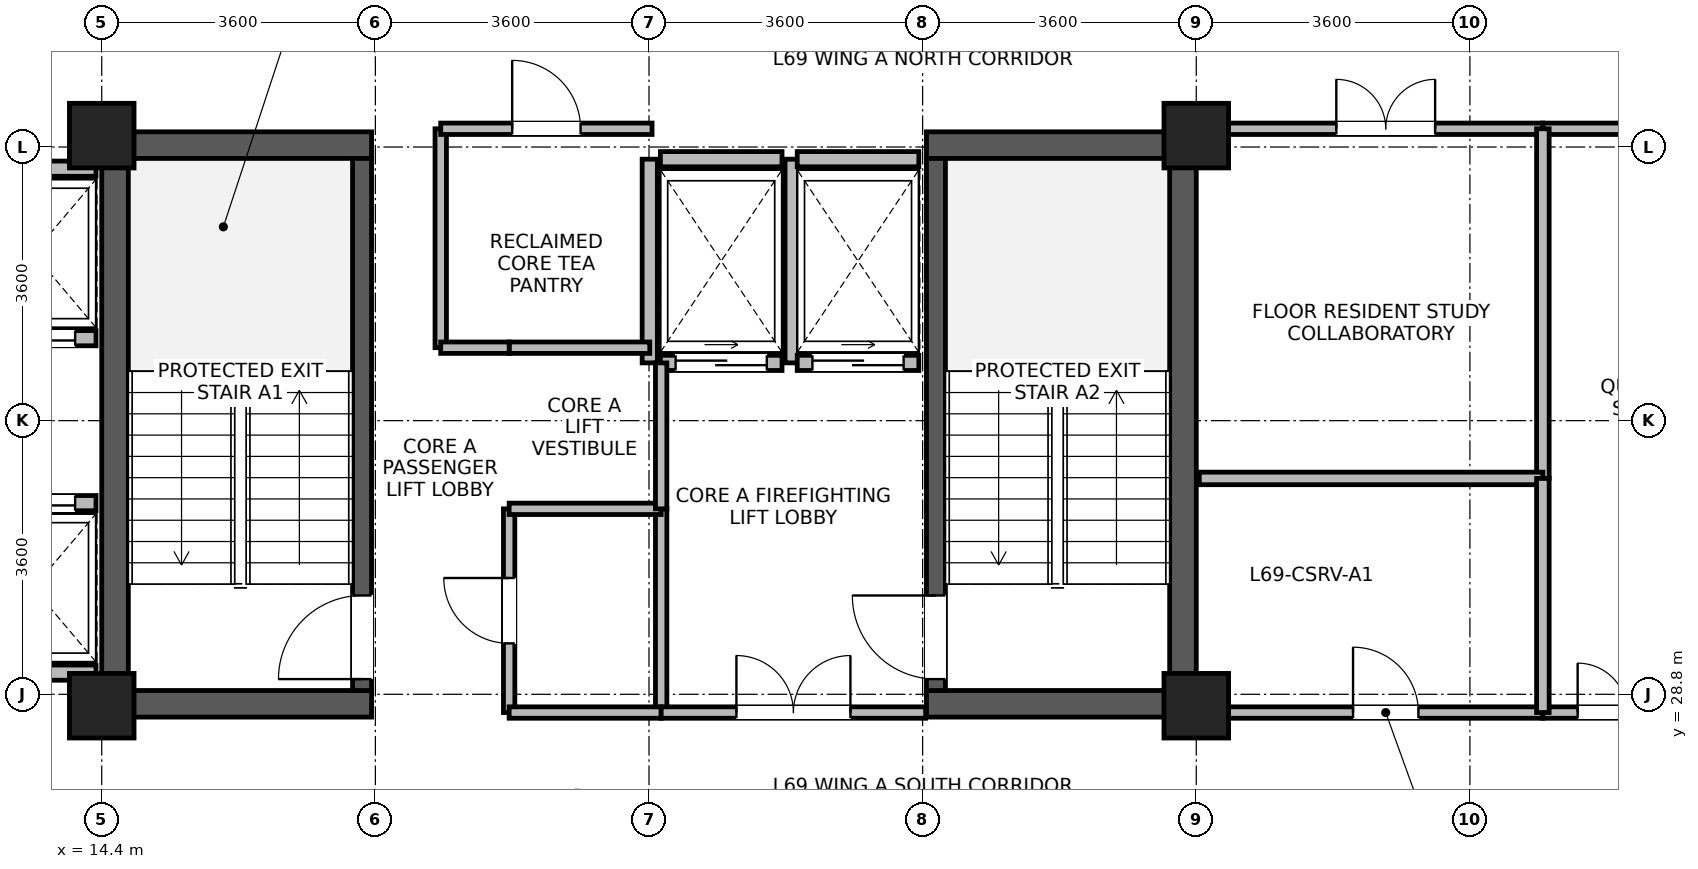
"""IFC4 building model, lengths in metres.
Left out: names, types, materials, properties, quantities, classifications, styles, units other than length and angle.
Written with IfcOpenShell. Run it as: python <this file> out.ifc"""

import sys

from ifc_helpers import new_model, si_unit, direction, frame, frame_2d, origin, origin_2d, place, context, subcontext, project, spatial, rectangle, extrude, source, transform, mapped, element, fill, save


model = new_model("IFC4")
c1 = context("Model", 3, precision=1e-05, world=origin(), true_north=direction((0.0, 1.0)))
c2 = subcontext(c1, "Body", "Model", "MODEL_VIEW")
j1 = project(units=[si_unit("LENGTHUNIT", "METRE"), si_unit("PLANEANGLEUNIT", "RADIAN")], contexts=[c1])
p1 = place(None, origin())
s1 = spatial("IfcSite", under=j1, at=p1, CompositionType="ELEMENT")
p2 = place(p1, origin())
s2 = spatial("IfcBuilding", under=s1, at=p2, CompositionType="ELEMENT")
p3 = place(p2, frame((0.0, 0.0, 268.4)))
s3 = spatial("IfcBuildingStorey", under=s2, at=p3, CompositionType="ELEMENT", Elevation=268.4)
for number, where, z_axis, x_axis in (
    (1, (14.575, 28.5, 0.0), (0.0, 0.0, 1.0), (0.0, 1.0, 0.0)),
    (2, (28.625, 28.5, 0.0), (0.0, 0.0, 1.0), (0.0, 1.0, 0.0)),
):
    element("IfcWall", number, at=place(p3, frame(where, z_axis=z_axis, x_axis=x_axis)), inside=s3, PredefinedType="SHEAR", context=c2, shape_type="SweptSolid", body=[
        extrude(rectangle(XDim=7.7, YDim=0.35, at=frame_2d((3.85, 0.0))), origin(), (0.0, 0.0, 1.0), 3.475),
    ])
for number, where, z_axis, x_axis in (
    (3, (14.75, 28.675, 0.0), (0.0, 0.0, 1.0), (1.0, 0.0, 0.0)),
    (4, (25.25, 28.675, 0.0), (0.0, 0.0, 1.0), (1.0, 0.0, 0.0)),
    (5, (14.75, 36.025, 0.0), (0.0, 0.0, 1.0), (1.0, 0.0, 0.0)),
    (6, (25.25, 36.025, 0.0), (0.0, 0.0, 1.0), (1.0, 0.0, 0.0)),
):
    element("IfcWall", number, at=place(p3, frame(where, z_axis=z_axis, x_axis=x_axis)), inside=s3, PredefinedType="SHEAR", context=c2, shape_type="SweptSolid", body=[
        extrude(rectangle(XDim=3.2, YDim=0.35, at=frame_2d((1.6, 0.0))), origin(), (0.0, 0.0, 1.0), 3.475),
    ])
p4 = place(p3, frame((17.825, 28.85, 0.0), z_axis=(0.0, 0.0, 1.0), x_axis=(0.0, 1.0, 0.0)))
e7 = element("IfcWall", 7, at=p4, inside=s3, PredefinedType="SHEAR", context=c2, shape_type="SweptSolid", body=[
    extrude(rectangle(XDim=7.0, YDim=0.25, at=frame_2d((3.5, 0.0))), origin(), (0.0, 0.0, 1.0), 3.475),
])
p5 = place(p4, frame((0.15, 0.0, 0.0)))
e8 = element("IfcOpeningElement", 8, at=p5, cuts=e7, PredefinedType="OPENING", context=c2, shape_type="SweptSolid", body=[
    extrude(rectangle(XDim=1.1, YDim=2.08, at=frame_2d((0.55, 1.04))), frame((0.0, 0.135, 0.0), z_axis=(0.0, -1.0, 0.0), x_axis=(1.0, 0.0, 0.0)), (0.0, 0.0, 1.0), 0.27),
])
p6 = place(p3, frame((25.375, 28.85, 0.0), z_axis=(0.0, 0.0, 1.0), x_axis=(0.0, 1.0, 0.0)))
e9 = element("IfcWall", 9, at=p6, inside=s3, PredefinedType="SHEAR", context=c2, shape_type="SweptSolid", body=[
    extrude(rectangle(XDim=7.0, YDim=0.25, at=frame_2d((3.5, 0.0))), origin(), (0.0, 0.0, 1.0), 3.475),
])
p7 = place(p6, frame((0.15, 0.0, 0.0)))
e10 = element("IfcOpeningElement", 10, at=p7, cuts=e9, PredefinedType="OPENING", context=c2, shape_type="SweptSolid", body=[
    extrude(rectangle(XDim=1.1, YDim=2.08, at=frame_2d((0.55, 1.04))), frame((0.0, 0.135, 0.0), z_axis=(0.0, -1.0, 0.0), x_axis=(1.0, 0.0, 0.0)), (0.0, 0.0, 1.0), 0.27),
])
m1 = source(origin(), c2, "Body", "SweptSolid", [
    extrude(rectangle(XDim=0.85, YDim=0.85, at=origin_2d()), origin(), (0.0, 0.0, 1.0), 3.7),
])
for number, where, z_axis, x_axis in (
    (11, (14.4, 28.65, 0.0), (0.0, 0.0, 1.0), (1.0, 0.0, 0.0)),
    (12, (14.4, 36.15, 0.0), (0.0, 0.0, 1.0), (1.0, 0.0, 0.0)),
    (13, (28.8, 28.65, 0.0), (0.0, 0.0, 1.0), (1.0, 0.0, 0.0)),
    (14, (28.8, 36.15, 0.0), (0.0, 0.0, 1.0), (1.0, 0.0, 0.0)),
):
    element("IfcColumn", number, at=place(p3, frame(where, z_axis=z_axis, x_axis=x_axis)), inside=s3, PredefinedType="COLUMN", context=c2, shape_type="MappedRepresentation", body=[
        mapped(m1, transform((0.0, 0.0, 0.0), x_axis=(1.0, 0.0, 0.0), y_axis=(0.0, 1.0, 0.0), z_axis=(0.0, 0.0, 1.0), scale=1.0)),
    ])
p8 = place(p3, frame((12.675, 33.485, 0.0), z_axis=(0.0, 0.0, 1.0), x_axis=(1.0, 0.0, 0.0)))
e15 = element("IfcWall", 15, at=p8, inside=s3, PredefinedType="PARTITIONING", context=c2, shape_type="SweptSolid", body=[
    extrude(rectangle(XDim=1.65, YDim=0.2, at=frame_2d((0.825, 0.0))), origin(), (0.0, 0.0, 1.0), 3.455),
])
p9 = place(p8, frame((0.275, 0.0, 0.0)))
e16 = element("IfcOpeningElement", 16, at=p9, cuts=e15, PredefinedType="OPENING", context=c2, shape_type="SweptSolid", body=[
    extrude(rectangle(XDim=1.1, YDim=2.12, at=frame_2d((0.55, 1.06))), frame((0.0, 0.11, 0.0), z_axis=(0.0, -1.0, 0.0), x_axis=(1.0, 0.0, 0.0)), (0.0, 0.0, 1.0), 0.22),
])
for number, where, z_axis, x_axis in (
    (17, (12.675, 35.715, 0.0), (0.0, 0.0, 1.0), (1.0, 0.0, 0.0)),
    (18, (12.675, 29.085, 0.0), (0.0, 0.0, 1.0), (1.0, 0.0, 0.0)),
):
    element("IfcWall", number, at=place(p3, frame(where, z_axis=z_axis, x_axis=x_axis)), inside=s3, PredefinedType="PARTITIONING", context=c2, shape_type="SweptSolid", body=[
        extrude(rectangle(XDim=1.65, YDim=0.2, at=frame_2d((0.825, 0.0))), origin(), (0.0, 0.0, 1.0), 3.455),
    ])
p10 = place(p3, frame((12.675, 31.315, 0.0), z_axis=(0.0, 0.0, 1.0), x_axis=(1.0, 0.0, 0.0)))
e19 = element("IfcWall", 19, at=p10, inside=s3, PredefinedType="PARTITIONING", context=c2, shape_type="SweptSolid", body=[
    extrude(rectangle(XDim=1.65, YDim=0.2, at=frame_2d((0.825, 0.0))), origin(), (0.0, 0.0, 1.0), 3.455),
])
p11 = place(p10, frame((0.275, 0.0, 0.0)))
e20 = element("IfcOpeningElement", 20, at=p11, cuts=e19, PredefinedType="OPENING", context=c2, shape_type="SweptSolid", body=[
    extrude(rectangle(XDim=1.1, YDim=2.12, at=frame_2d((0.55, 1.06))), frame((0.0, 0.11, 0.0), z_axis=(0.0, -1.0, 0.0), x_axis=(1.0, 0.0, 0.0)), (0.0, 0.0, 1.0), 0.22),
])
p12 = place(p3, frame((21.75, 33.16, 0.0), z_axis=(0.0, 0.0, 1.0), x_axis=(1.0, 0.0, 0.0)))
e21 = element("IfcWall", 21, at=p12, inside=s3, PredefinedType="PARTITIONING", context=c2, shape_type="SweptSolid", body=[
    extrude(rectangle(XDim=1.6, YDim=0.2, at=frame_2d((0.8, 0.0))), origin(), (0.0, 0.0, 1.0), 3.455),
])
p13 = place(p12, frame((0.2, 0.0, 0.0)))
e22 = element("IfcOpeningElement", 22, at=p13, cuts=e21, PredefinedType="OPENING", context=c2, shape_type="SweptSolid", body=[
    extrude(rectangle(XDim=1.2, YDim=2.12, at=frame_2d((0.6, 1.06))), frame((0.0, 0.11, 0.0), z_axis=(0.0, -1.0, 0.0), x_axis=(1.0, 0.0, 0.0)), (0.0, 0.0, 1.0), 0.22),
])
p14 = place(p3, frame((21.75, 35.84, 0.0), z_axis=(0.0, 0.0, 1.0), x_axis=(1.0, 0.0, 0.0)))
e23 = element("IfcWall", 23, at=p14, inside=s3, PredefinedType="PARTITIONING", context=c2, shape_type="SweptSolid", body=[
    extrude(rectangle(XDim=1.6, YDim=0.2, at=frame_2d((0.8, 0.0))), origin(), (0.0, 0.0, 1.0), 2.555),
])
for number, where, z_axis, x_axis in (
    (24, (21.61, 33.16, 0.0), (0.0, 0.0, 1.0), (0.0, 1.0, 0.0)),
    (25, (23.49, 33.16, 0.0), (0.0, 0.0, 1.0), (0.0, 1.0, 0.0)),
):
    element("IfcWall", number, at=place(p3, frame(where, z_axis=z_axis, x_axis=x_axis)), inside=s3, PredefinedType="PARTITIONING", context=c2, shape_type="SweptSolid", body=[
        extrude(rectangle(XDim=2.68, YDim=0.2, at=frame_2d((1.34, 0.0))), origin(), (0.0, 0.0, 1.0), 3.455),
    ])
p15 = place(p3, frame((23.55, 33.16, 0.0), z_axis=(0.0, 0.0, 1.0), x_axis=(1.0, 0.0, 0.0)))
e26 = element("IfcWall", 26, at=p15, inside=s3, PredefinedType="PARTITIONING", context=c2, shape_type="SweptSolid", body=[
    extrude(rectangle(XDim=1.6, YDim=0.2, at=frame_2d((0.8, 0.0))), origin(), (0.0, 0.0, 1.0), 3.455),
])
p16 = place(p15, frame((0.2, 0.0, 0.0)))
e27 = element("IfcOpeningElement", 27, at=p16, cuts=e26, PredefinedType="OPENING", context=c2, shape_type="SweptSolid", body=[
    extrude(rectangle(XDim=1.2, YDim=2.12, at=frame_2d((0.6, 1.06))), frame((0.0, 0.11, 0.0), z_axis=(0.0, -1.0, 0.0), x_axis=(1.0, 0.0, 0.0)), (0.0, 0.0, 1.0), 0.22),
])
p17 = place(p3, frame((23.55, 35.84, 0.0), z_axis=(0.0, 0.0, 1.0), x_axis=(1.0, 0.0, 0.0)))
e28 = element("IfcWall", 28, at=p17, inside=s3, PredefinedType="PARTITIONING", context=c2, shape_type="SweptSolid", body=[
    extrude(rectangle(XDim=1.6, YDim=0.2, at=frame_2d((0.8, 0.0))), origin(), (0.0, 0.0, 1.0), 2.555),
])
p18 = place(p3, frame((29.225, 28.56, 0.0), z_axis=(0.0, 0.0, 1.0), x_axis=(1.0, 0.0, 0.0)))
e29 = element("IfcWall", 29, at=p18, inside=s3, PredefinedType="PARTITIONING", context=c2, shape_type="SweptSolid", body=[
    extrude(rectangle(XDim=4.135, YDim=0.15, at=frame_2d((2.067, 0.0))), origin(), (0.0, 0.0, 1.0), 2.905),
])
p19 = place(p18, frame((1.637, 0.0, 0.0)))
e30 = element("IfcOpeningElement", 30, at=p19, cuts=e29, PredefinedType="OPENING", context=c2, shape_type="SweptSolid", body=[
    extrude(rectangle(XDim=0.86, YDim=2.02, at=frame_2d((0.43, 1.01))), frame((0.0, 0.085, 0.0), z_axis=(0.0, -1.0, 0.0), x_axis=(1.0, 0.0, 0.0)), (0.0, 0.0, 1.0), 0.17),
])
p20 = place(p3, frame((29.225, 36.24, 0.0), z_axis=(0.0, 0.0, 1.0), x_axis=(1.0, 0.0, 0.0)))
e31 = element("IfcWall", 31, at=p20, inside=s3, PredefinedType="PARTITIONING", context=c2, shape_type="SweptSolid", body=[
    extrude(rectangle(XDim=4.135, YDim=0.15, at=frame_2d((2.067, 0.0))), origin(), (0.0, 0.0, 1.0), 2.905),
])
p21 = place(p20, frame((1.417, 0.0, 0.0)))
e32 = element("IfcOpeningElement", 32, at=p21, cuts=e31, PredefinedType="OPENING", context=c2, shape_type="SweptSolid", body=[
    extrude(rectangle(XDim=1.3, YDim=2.12, at=frame_2d((0.65, 1.06))), frame((0.0, 0.085, 0.0), z_axis=(0.0, -1.0, 0.0), x_axis=(1.0, 0.0, 0.0)), (0.0, 0.0, 1.0), 0.17),
])
p22 = place(p3, frame((33.36, 28.56, 0.0), z_axis=(0.0, 0.0, 1.0), x_axis=(1.0, 0.0, 0.0)))
e33 = element("IfcWall", 33, at=p22, inside=s3, PredefinedType="PARTITIONING", context=c2, shape_type="SweptSolid", body=[
    extrude(rectangle(XDim=2.215, YDim=0.15, at=frame_2d((1.107, 0.0))), origin(), (0.0, 0.0, 1.0), 2.905),
])
p23 = place(p22, frame((0.458, 0.0, 0.0)))
e34 = element("IfcOpeningElement", 34, at=p23, cuts=e33, PredefinedType="OPENING", context=c2, shape_type="SweptSolid", body=[
    extrude(rectangle(XDim=1.3, YDim=2.12, at=frame_2d((0.65, 1.06))), frame((0.0, 0.085, 0.0), z_axis=(0.0, -1.0, 0.0), x_axis=(1.0, 0.0, 0.0)), (0.0, 0.0, 1.0), 0.17),
])
p24 = place(p3, frame((33.36, 36.24, 0.0), z_axis=(0.0, 0.0, 1.0), x_axis=(1.0, 0.0, 0.0)))
e35 = element("IfcWall", 35, at=p24, inside=s3, PredefinedType="PARTITIONING", context=c2, shape_type="SweptSolid", body=[
    extrude(rectangle(XDim=2.215, YDim=0.15, at=frame_2d((1.107, 0.0))), origin(), (0.0, 0.0, 1.0), 2.905),
])
p25 = place(p3, frame((18.86, 33.36, 0.0), z_axis=(0.0, 0.0, 1.0), x_axis=(0.0, 1.0, 0.0)))
e36 = element("IfcWall", 36, at=p25, inside=s3, PredefinedType="PARTITIONING", context=c2, shape_type="SweptSolid", body=[
    extrude(rectangle(XDim=2.88, YDim=0.15, at=frame_2d((1.44, 0.0))), origin(), (0.0, 0.0, 1.0), 3.455),
])
p26 = place(p3, frame((18.86, 36.24, 0.0), z_axis=(0.0, 0.0, 1.0), x_axis=(1.0, 0.0, 0.0)))
e37 = element("IfcWall", 37, at=p26, inside=s3, PredefinedType="PARTITIONING", context=c2, shape_type="SweptSolid", body=[
    extrude(rectangle(XDim=2.78, YDim=0.15, at=frame_2d((1.39, 0.0))), origin(), (0.0, 0.0, 1.0), 2.555),
])
p27 = place(p26, frame((0.94, 0.0, 0.0)))
e38 = element("IfcOpeningElement", 38, at=p27, cuts=e37, PredefinedType="OPENING", context=c2, shape_type="SweptSolid", body=[
    extrude(rectangle(XDim=0.9, YDim=2.08, at=frame_2d((0.45, 1.04))), frame((0.0, 0.085, 0.0), z_axis=(0.0, -1.0, 0.0), x_axis=(1.0, 0.0, 0.0)), (0.0, 0.0, 1.0), 0.17),
])
p28 = place(p3, frame((19.76, 28.56, 0.0), z_axis=(0.0, 0.0, 1.0), x_axis=(0.0, 1.0, 0.0)))
e39 = element("IfcWall", 39, at=p28, inside=s3, PredefinedType="PARTITIONING", context=c2, shape_type="SweptSolid", body=[
    extrude(rectangle(XDim=2.68, YDim=0.15, at=frame_2d((1.34, 0.0))), origin(), (0.0, 0.0, 1.0), 3.455),
])
p29 = place(p28, frame((0.91, 0.0, 0.0)))
e40 = element("IfcOpeningElement", 40, at=p29, cuts=e39, PredefinedType="OPENING", context=c2, shape_type="SweptSolid", body=[
    extrude(rectangle(XDim=0.86, YDim=2.02, at=frame_2d((0.43, 1.01))), frame((0.0, 0.085, 0.0), z_axis=(0.0, -1.0, 0.0), x_axis=(1.0, 0.0, 0.0)), (0.0, 0.0, 1.0), 0.17),
])
p30 = place(p3, frame((21.76, 28.56, 0.0), z_axis=(0.0, 0.0, 1.0), x_axis=(0.0, 1.0, 0.0)))
e41 = element("IfcWall", 41, at=p30, inside=s3, PredefinedType="PARTITIONING", context=c2, shape_type="SweptSolid", body=[
    extrude(rectangle(XDim=2.68, YDim=0.15, at=frame_2d((1.34, 0.0))), origin(), (0.0, 0.0, 1.0), 3.455),
])
p31 = place(p3, frame((19.76, 28.56, 0.0), z_axis=(0.0, 0.0, 1.0), x_axis=(1.0, 0.0, 0.0)))
e42 = element("IfcWall", 42, at=p31, inside=s3, PredefinedType="PARTITIONING", context=c2, shape_type="SweptSolid", body=[
    extrude(rectangle(XDim=2.0, YDim=0.15, at=frame_2d((1.0, 0.0))), origin(), (0.0, 0.0, 1.0), 2.555),
])
p32 = place(p3, frame((19.76, 31.24, 0.0), z_axis=(0.0, 0.0, 1.0), x_axis=(1.0, 0.0, 0.0)))
e43 = element("IfcWall", 43, at=p32, inside=s3, PredefinedType="PARTITIONING", context=c2, shape_type="SweptSolid", body=[
    extrude(rectangle(XDim=2.0, YDim=0.15, at=frame_2d((1.0, 0.0))), origin(), (0.0, 0.0, 1.0), 3.455),
])
p33 = place(p3, frame((19.76, 33.36, 0.0), z_axis=(0.0, 0.0, 1.0), x_axis=(1.0, 0.0, 0.0)))
e44 = element("IfcWall", 44, at=p33, inside=s3, PredefinedType="PARTITIONING", context=c2, shape_type="SweptSolid", body=[
    extrude(rectangle(XDim=1.85, YDim=0.15, at=frame_2d((0.925, 0.0))), origin(), (0.0, 0.0, 1.0), 3.455),
])
p34 = place(p3, frame((18.86, 33.36, 0.0), z_axis=(0.0, 0.0, 1.0), x_axis=(1.0, 0.0, 0.0)))
e45 = element("IfcWall", 45, at=p34, inside=s3, PredefinedType="PARTITIONING", context=c2, shape_type="SweptSolid", body=[
    extrude(rectangle(XDim=0.9, YDim=0.15, at=frame_2d((0.45, 0.0))), origin(), (0.0, 0.0, 1.0), 3.455),
])
p35 = place(p3, frame((33.36, 31.64, 0.0), z_axis=(0.0, 0.0, 1.0), x_axis=(0.0, 1.0, 0.0)))
e46 = element("IfcWall", 46, at=p35, inside=s3, PredefinedType="PARTITIONING", context=c2, shape_type="SweptSolid", body=[
    extrude(rectangle(XDim=4.6, YDim=0.165, at=frame_2d((2.3, 0.0))), origin(), (0.0, 0.0, 1.0), 3.455),
])
p36 = place(p3, frame((28.84, 31.64, 0.0), z_axis=(0.0, 0.0, 1.0), x_axis=(1.0, 0.0, 0.0)))
e47 = element("IfcWall", 47, at=p36, inside=s3, PredefinedType="PARTITIONING", context=c2, shape_type="SweptSolid", body=[
    extrude(rectangle(XDim=4.52, YDim=0.165, at=frame_2d((2.26, 0.0))), origin(), (0.0, 0.0, 1.0), 3.455),
])
p37 = place(p3, frame((21.76, 28.56, 0.0), z_axis=(0.0, 0.0, 1.0), x_axis=(1.0, 0.0, 0.0)))
e48 = element("IfcWall", 48, at=p37, inside=s3, PredefinedType="PARTITIONING", context=c2, shape_type="SweptSolid", body=[
    extrude(rectangle(XDim=3.48, YDim=0.15, at=frame_2d((1.74, 0.0))), origin(), (0.0, 0.0, 1.0), 2.555),
])
p38 = place(p37, frame((0.99, 0.0, 0.0)))
e49 = element("IfcOpeningElement", 49, at=p38, cuts=e48, PredefinedType="OPENING", context=c2, shape_type="SweptSolid", body=[
    extrude(rectangle(XDim=1.5, YDim=2.1, at=frame_2d((0.75, 1.05))), frame((0.0, 0.085, 0.0), z_axis=(0.0, -1.0, 0.0), x_axis=(1.0, 0.0, 0.0)), (0.0, 0.0, 1.0), 0.17),
])
p39 = place(p3, frame((33.36, 28.56, 0.0), z_axis=(0.0, 0.0, 1.0), x_axis=(0.0, 1.0, 0.0)))
e50 = element("IfcWall", 50, at=p39, inside=s3, PredefinedType="PARTITIONING", context=c2, shape_type="SweptSolid", body=[
    extrude(rectangle(XDim=3.08, YDim=0.165, at=frame_2d((1.54, 0.0))), origin(), (0.0, 0.0, 1.0), 3.455),
])
p40 = place(p3, frame((21.76, 31.24, 0.0), z_axis=(0.0, 0.0, 1.0), x_axis=(0.0, 1.0, 0.0)))
e51 = element("IfcWall", 51, at=p40, inside=s3, PredefinedType="PARTITIONING", context=c2, shape_type="SweptSolid", body=[
    extrude(rectangle(XDim=1.92, YDim=0.15, at=frame_2d((0.96, 0.0))), origin(), (0.0, 0.0, 1.0), 3.455),
])
p41 = place(p5, origin())
e52 = element("IfcDoor", 52, at=p41, inside=s3, OperationType="SINGLE_SWING_LEFT", PredefinedType="DOOR", context=c2, shape_type="SweptSolid", body=[
    extrude(rectangle(XDim=1.1, YDim=2.08, at=frame_2d((0.55, 1.04))), frame((0.0, 0.025, 0.0), z_axis=(0.0, -1.0, 0.0), x_axis=(1.0, 0.0, 0.0)), (0.0, 0.0, 1.0), 0.05),
])
fill(e8, e52)
p42 = place(p7, origin())
e53 = element("IfcDoor", 53, at=p42, inside=s3, OperationType="SINGLE_SWING_RIGHT", PredefinedType="DOOR", context=c2, shape_type="SweptSolid", body=[
    extrude(rectangle(XDim=1.1, YDim=2.08, at=frame_2d((0.55, 1.04))), frame((0.0, 0.025, 0.0), z_axis=(0.0, -1.0, 0.0), x_axis=(1.0, 0.0, 0.0)), (0.0, 0.0, 1.0), 0.05),
])
fill(e10, e53)
p43 = place(p9, origin())
e54 = element("IfcDoor", 54, at=p43, inside=s3, OperationType="SLIDING_TO_LEFT", PredefinedType="DOOR", context=c2, shape_type="SweptSolid", body=[
    extrude(rectangle(XDim=1.1, YDim=2.12, at=frame_2d((0.55, 1.06))), frame((0.0, 0.025, 0.0), z_axis=(0.0, -1.0, 0.0), x_axis=(1.0, 0.0, 0.0)), (0.0, 0.0, 1.0), 0.05),
])
fill(e16, e54)
p44 = place(p11, origin())
e55 = element("IfcDoor", 55, at=p44, inside=s3, OperationType="SLIDING_TO_LEFT", PredefinedType="DOOR", context=c2, shape_type="SweptSolid", body=[
    extrude(rectangle(XDim=1.1, YDim=2.12, at=frame_2d((0.55, 1.06))), frame((0.0, 0.025, 0.0), z_axis=(0.0, -1.0, 0.0), x_axis=(1.0, 0.0, 0.0)), (0.0, 0.0, 1.0), 0.05),
])
fill(e20, e55)
p45 = place(p13, origin())
e56 = element("IfcDoor", 56, at=p45, inside=s3, OperationType="SLIDING_TO_RIGHT", PredefinedType="DOOR", context=c2, shape_type="SweptSolid", body=[
    extrude(rectangle(XDim=1.2, YDim=2.12, at=frame_2d((0.6, 1.06))), frame((0.0, 0.025, 0.0), z_axis=(0.0, -1.0, 0.0), x_axis=(1.0, 0.0, 0.0)), (0.0, 0.0, 1.0), 0.05),
])
fill(e22, e56)
p46 = place(p16, origin())
e57 = element("IfcDoor", 57, at=p46, inside=s3, OperationType="SLIDING_TO_RIGHT", PredefinedType="DOOR", context=c2, shape_type="SweptSolid", body=[
    extrude(rectangle(XDim=1.2, YDim=2.12, at=frame_2d((0.6, 1.06))), frame((0.0, 0.025, 0.0), z_axis=(0.0, -1.0, 0.0), x_axis=(1.0, 0.0, 0.0)), (0.0, 0.0, 1.0), 0.05),
])
fill(e27, e57)
p47 = place(p19, origin())
e58 = element("IfcDoor", 58, at=p47, inside=s3, OperationType="SINGLE_SWING_LEFT", PredefinedType="DOOR", context=c2, shape_type="SweptSolid", body=[
    extrude(rectangle(XDim=0.86, YDim=2.02, at=frame_2d((0.43, 1.01))), frame((0.0, 0.025, 0.0), z_axis=(0.0, -1.0, 0.0), x_axis=(1.0, 0.0, 0.0)), (0.0, 0.0, 1.0), 0.05),
])
fill(e30, e58)
p48 = place(p21, origin())
e59 = element("IfcDoor", 59, at=p48, inside=s3, OperationType="DOUBLE_DOOR_SINGLE_SWING", PredefinedType="DOOR", context=c2, shape_type="SweptSolid", body=[
    extrude(rectangle(XDim=1.3, YDim=2.12, at=frame_2d((0.65, 1.06))), frame((0.0, 0.025, 0.0), z_axis=(0.0, -1.0, 0.0), x_axis=(1.0, 0.0, 0.0)), (0.0, 0.0, 1.0), 0.05),
])
fill(e32, e59)
p49 = place(p23, origin())
e60 = element("IfcDoor", 60, at=p49, inside=s3, OperationType="DOUBLE_DOOR_SINGLE_SWING", PredefinedType="DOOR", context=c2, shape_type="SweptSolid", body=[
    extrude(rectangle(XDim=1.3, YDim=2.12, at=frame_2d((0.65, 1.06))), frame((0.0, 0.025, 0.0), z_axis=(0.0, -1.0, 0.0), x_axis=(1.0, 0.0, 0.0)), (0.0, 0.0, 1.0), 0.05),
])
fill(e34, e60)
p50 = place(p27, origin())
e61 = element("IfcDoor", 61, at=p50, inside=s3, OperationType="SINGLE_SWING_LEFT", PredefinedType="DOOR", context=c2, shape_type="SweptSolid", body=[
    extrude(rectangle(XDim=0.9, YDim=2.08, at=frame_2d((0.45, 1.04))), frame((0.0, 0.025, 0.0), z_axis=(0.0, -1.0, 0.0), x_axis=(1.0, 0.0, 0.0)), (0.0, 0.0, 1.0), 0.05),
])
fill(e38, e61)
p51 = place(p29, origin())
e62 = element("IfcDoor", 62, at=p51, inside=s3, OperationType="SINGLE_SWING_RIGHT", PredefinedType="DOOR", context=c2, shape_type="SweptSolid", body=[
    extrude(rectangle(XDim=0.86, YDim=2.02, at=frame_2d((0.43, 1.01))), frame((0.0, 0.025, 0.0), z_axis=(0.0, -1.0, 0.0), x_axis=(1.0, 0.0, 0.0)), (0.0, 0.0, 1.0), 0.05),
])
fill(e40, e62)
p52 = place(p38, origin())
e63 = element("IfcDoor", 63, at=p52, inside=s3, OperationType="DOUBLE_DOOR_SINGLE_SWING", PredefinedType="DOOR", context=c2, shape_type="SweptSolid", body=[
    extrude(rectangle(XDim=1.5, YDim=2.1, at=frame_2d((0.75, 1.05))), frame((0.0, 0.025, 0.0), z_axis=(0.0, -1.0, 0.0), x_axis=(1.0, 0.0, 0.0)), (0.0, 0.0, 1.0), 0.05),
])
fill(e49, e63)
save(model, sys.argv[1])
